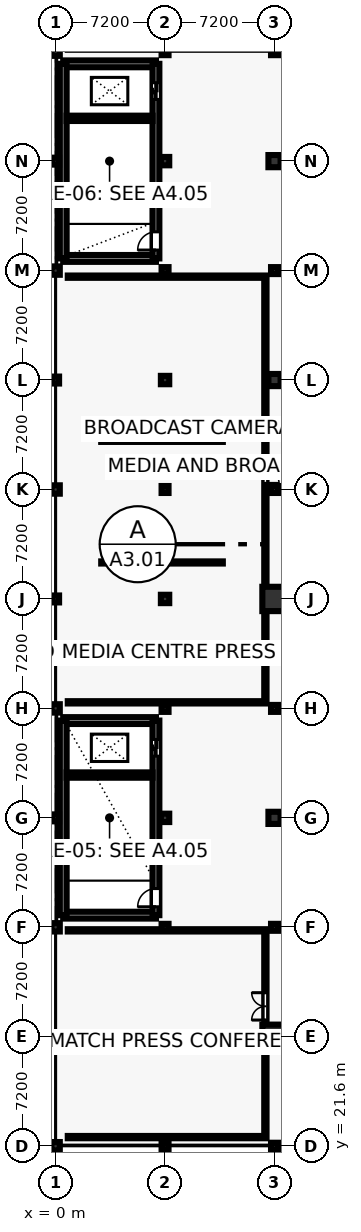
"""IFC4 building model, lengths in metres.
Left out: names, types, materials, properties, quantities, classifications, styles, units other than length and angle.
Written with IfcOpenShell. Run it as: python <this file> out.ifc"""

import sys

from ifc_helpers import new_model, si_unit, direction, frame, frame_2d, origin, origin_2d, place, context, subcontext, project, spatial, rectangle, circle, hollow_circle, extrude, element, fill, save


model = new_model("IFC4")
c1 = context("Model", 3, precision=1e-05, world=origin(), true_north=direction((0.0, 1.0)))
c2 = subcontext(c1, "Body", "Model", "MODEL_VIEW")
j1 = project(units=[si_unit("LENGTHUNIT", "METRE"), si_unit("PLANEANGLEUNIT", "RADIAN")], contexts=[c1])
p1 = place(None, origin())
s1 = spatial("IfcSite", under=j1, at=p1, CompositionType="ELEMENT")
p2 = place(p1, origin())
s2 = spatial("IfcBuilding", under=s1, at=p2, CompositionType="ELEMENT")
p3 = place(p2, frame((0.0, 0.0, 18.6)))
s3 = spatial("IfcBuildingStorey", under=s2, at=p3, CompositionType="ELEMENT", Elevation=18.6)
p4 = place(p3, frame((0.0, 21.6, 0.0), z_axis=(0.0, 0.0, 1.0), x_axis=(1.0, 0.0, 0.0)))
e1 = element("IfcColumn", 1, at=p4, inside=s3, PredefinedType="COLUMN", context=c2, shape_type="SweptSolid", body=[
    extrude(rectangle(XDim=0.55, YDim=0.55, at=origin_2d()), origin(), (0.0, 0.0, 1.0), 4.4),
])
p5 = place(p3, frame((0.0, 28.8, 0.0), z_axis=(0.0, 0.0, 1.0), x_axis=(1.0, 0.0, 0.0)))
e2 = element("IfcColumn", 2, at=p5, inside=s3, PredefinedType="COLUMN", context=c2, shape_type="SweptSolid", body=[
    extrude(hollow_circle(Radius=0.229, WallThickness=0.02, at=origin_2d()), origin(), (0.0, 0.0, 1.0), 4.4),
])
p6 = place(p3, frame((0.0, 36.0, 0.0), z_axis=(0.0, 0.0, 1.0), x_axis=(1.0, 0.0, 0.0)))
e3 = element("IfcColumn", 3, at=p6, inside=s3, PredefinedType="COLUMN", context=c2, shape_type="SweptSolid", body=[
    extrude(rectangle(XDim=0.55, YDim=0.55, at=origin_2d()), origin(), (0.0, 0.0, 1.0), 4.4),
])
p7 = place(p3, frame((0.0, 43.2, 0.0), z_axis=(0.0, 0.0, 1.0), x_axis=(1.0, 0.0, 0.0)))
e4 = element("IfcColumn", 4, at=p7, inside=s3, PredefinedType="COLUMN", context=c2, shape_type="SweptSolid", body=[
    extrude(hollow_circle(Radius=0.229, WallThickness=0.02, at=origin_2d()), origin(), (0.0, 0.0, 1.0), 4.4),
])
p8 = place(p3, frame((0.0, 50.4, 0.0), z_axis=(0.0, 0.0, 1.0), x_axis=(1.0, 0.0, 0.0)))
e5 = element("IfcColumn", 5, at=p8, inside=s3, PredefinedType="COLUMN", context=c2, shape_type="SweptSolid", body=[
    extrude(rectangle(XDim=0.55, YDim=0.55, at=origin_2d()), origin(), (0.0, 0.0, 1.0), 4.4),
])
p9 = place(p3, frame((0.0, 57.6, 0.0), z_axis=(0.0, 0.0, 1.0), x_axis=(1.0, 0.0, 0.0)))
e6 = element("IfcColumn", 6, at=p9, inside=s3, PredefinedType="COLUMN", context=c2, shape_type="SweptSolid", body=[
    extrude(hollow_circle(Radius=0.229, WallThickness=0.02, at=origin_2d()), origin(), (0.0, 0.0, 1.0), 4.4),
])
p10 = place(p3, frame((0.0, 64.8, 0.0), z_axis=(0.0, 0.0, 1.0), x_axis=(1.0, 0.0, 0.0)))
e7 = element("IfcColumn", 7, at=p10, inside=s3, PredefinedType="COLUMN", context=c2, shape_type="SweptSolid", body=[
    extrude(rectangle(XDim=0.55, YDim=0.55, at=origin_2d()), origin(), (0.0, 0.0, 1.0), 4.4),
])
p11 = place(p3, frame((0.0, 72.0, 0.0), z_axis=(0.0, 0.0, 1.0), x_axis=(1.0, 0.0, 0.0)))
e8 = element("IfcColumn", 8, at=p11, inside=s3, PredefinedType="COLUMN", context=c2, shape_type="SweptSolid", body=[
    extrude(hollow_circle(Radius=0.229, WallThickness=0.02, at=origin_2d()), origin(), (0.0, 0.0, 1.0), 4.4),
])
p12 = place(p3, frame((0.0, 79.2, 0.0), z_axis=(0.0, 0.0, 1.0), x_axis=(1.0, 0.0, 0.0)))
e9 = element("IfcColumn", 9, at=p12, inside=s3, PredefinedType="COLUMN", context=c2, shape_type="SweptSolid", body=[
    extrude(rectangle(XDim=0.55, YDim=0.55, at=origin_2d()), origin(), (0.0, 0.0, 1.0), 4.4),
])
p13 = place(p3, frame((0.0, 86.4, 0.0), z_axis=(0.0, 0.0, 1.0), x_axis=(1.0, 0.0, 0.0)))
e10 = element("IfcColumn", 10, at=p13, inside=s3, PredefinedType="COLUMN", context=c2, shape_type="SweptSolid", body=[
    extrude(hollow_circle(Radius=0.229, WallThickness=0.02, at=origin_2d()), origin(), (0.0, 0.0, 1.0), 4.4),
])
p14 = place(p3, frame((0.0, 93.6, 0.0), z_axis=(0.0, 0.0, 1.0), x_axis=(1.0, 0.0, 0.0)))
e11 = element("IfcColumn", 11, at=p14, inside=s3, PredefinedType="COLUMN", context=c2, shape_type="SweptSolid", body=[
    extrude(rectangle(XDim=0.55, YDim=0.55, at=origin_2d()), origin(), (0.0, 0.0, 1.0), 4.4),
])
p15 = place(p3, frame((7.2, 21.6, 0.0), z_axis=(0.0, 0.0, 1.0), x_axis=(1.0, 0.0, 0.0)))
e12 = element("IfcColumn", 12, at=p15, inside=s3, PredefinedType="COLUMN", context=c2, shape_type="SweptSolid", body=[
    extrude(hollow_circle(Radius=0.229, WallThickness=0.02, at=origin_2d()), origin(), (0.0, 0.0, 1.0), 4.4),
])
p16 = place(p3, frame((7.2, 28.8, 0.0), z_axis=(0.0, 0.0, 1.0), x_axis=(1.0, 0.0, 0.0)))
e13 = element("IfcColumn", 13, at=p16, inside=s3, PredefinedType="COLUMN", context=c2, shape_type="SweptSolid", body=[
    extrude(rectangle(XDim=0.55, YDim=0.55, at=origin_2d()), origin(), (0.0, 0.0, 1.0), 4.4),
])
p17 = place(p3, frame((7.2, 36.0, 0.0), z_axis=(0.0, 0.0, 1.0), x_axis=(1.0, 0.0, 0.0)))
e14 = element("IfcColumn", 14, at=p17, inside=s3, PredefinedType="COLUMN", context=c2, shape_type="SweptSolid", body=[
    extrude(hollow_circle(Radius=0.229, WallThickness=0.02, at=origin_2d()), origin(), (0.0, 0.0, 1.0), 4.4),
])
p18 = place(p3, frame((7.2, 43.2, 0.0), z_axis=(0.0, 0.0, 1.0), x_axis=(1.0, 0.0, 0.0)))
e15 = element("IfcColumn", 15, at=p18, inside=s3, PredefinedType="COLUMN", context=c2, shape_type="SweptSolid", body=[
    extrude(rectangle(XDim=0.55, YDim=0.55, at=origin_2d()), origin(), (0.0, 0.0, 1.0), 4.4),
])
p19 = place(p3, frame((7.2, 50.4, 0.0), z_axis=(0.0, 0.0, 1.0), x_axis=(1.0, 0.0, 0.0)))
e16 = element("IfcColumn", 16, at=p19, inside=s3, PredefinedType="COLUMN", context=c2, shape_type="SweptSolid", body=[
    extrude(hollow_circle(Radius=0.229, WallThickness=0.02, at=origin_2d()), origin(), (0.0, 0.0, 1.0), 4.4),
])
p20 = place(p3, frame((7.2, 57.6, 0.0), z_axis=(0.0, 0.0, 1.0), x_axis=(1.0, 0.0, 0.0)))
e17 = element("IfcColumn", 17, at=p20, inside=s3, PredefinedType="COLUMN", context=c2, shape_type="SweptSolid", body=[
    extrude(rectangle(XDim=0.55, YDim=0.55, at=origin_2d()), origin(), (0.0, 0.0, 1.0), 4.4),
])
p21 = place(p3, frame((7.2, 64.8, 0.0), z_axis=(0.0, 0.0, 1.0), x_axis=(1.0, 0.0, 0.0)))
e18 = element("IfcColumn", 18, at=p21, inside=s3, PredefinedType="COLUMN", context=c2, shape_type="SweptSolid", body=[
    extrude(hollow_circle(Radius=0.229, WallThickness=0.02, at=origin_2d()), origin(), (0.0, 0.0, 1.0), 4.4),
])
p22 = place(p3, frame((7.2, 72.0, 0.0), z_axis=(0.0, 0.0, 1.0), x_axis=(1.0, 0.0, 0.0)))
e19 = element("IfcColumn", 19, at=p22, inside=s3, PredefinedType="COLUMN", context=c2, shape_type="SweptSolid", body=[
    extrude(rectangle(XDim=0.55, YDim=0.55, at=origin_2d()), origin(), (0.0, 0.0, 1.0), 4.4),
])
p23 = place(p3, frame((7.2, 79.2, 0.0), z_axis=(0.0, 0.0, 1.0), x_axis=(1.0, 0.0, 0.0)))
e20 = element("IfcColumn", 20, at=p23, inside=s3, PredefinedType="COLUMN", context=c2, shape_type="SweptSolid", body=[
    extrude(hollow_circle(Radius=0.229, WallThickness=0.02, at=origin_2d()), origin(), (0.0, 0.0, 1.0), 4.4),
])
p24 = place(p3, frame((7.2, 86.4, 0.0), z_axis=(0.0, 0.0, 1.0), x_axis=(1.0, 0.0, 0.0)))
e21 = element("IfcColumn", 21, at=p24, inside=s3, PredefinedType="COLUMN", context=c2, shape_type="SweptSolid", body=[
    extrude(rectangle(XDim=0.55, YDim=0.55, at=origin_2d()), origin(), (0.0, 0.0, 1.0), 4.4),
])
for number, where, z_axis, x_axis in (
    (22, (7.2, 93.6, 0.0), (0.0, 0.0, 1.0), (1.0, 0.0, 0.0)),
    (23, (14.4, 21.6, 0.0), (0.0, 0.0, 1.0), (1.0, 0.0, 0.0)),
):
    element("IfcColumn", number, at=place(p3, frame(where, z_axis=z_axis, x_axis=x_axis)), inside=s3, PredefinedType="COLUMN", context=c2, shape_type="SweptSolid", body=[
        extrude(hollow_circle(Radius=0.229, WallThickness=0.02, at=origin_2d()), origin(), (0.0, 0.0, 1.0), 4.4),
    ])
p25 = place(p3, frame((14.4, 28.8, 0.0), z_axis=(0.0, 0.0, 1.0), x_axis=(1.0, 0.0, 0.0)))
e24 = element("IfcColumn", 24, at=p25, inside=s3, PredefinedType="COLUMN", context=c2, shape_type="SweptSolid", body=[
    extrude(circle(Radius=0.8, at=origin_2d()), origin(), (0.0, 0.0, 1.0), 4.4),
])
p26 = place(p3, frame((14.4, 36.0, 0.0), z_axis=(0.0, 0.0, 1.0), x_axis=(1.0, 0.0, 0.0)))
e25 = element("IfcColumn", 25, at=p26, inside=s3, PredefinedType="COLUMN", context=c2, shape_type="SweptSolid", body=[
    extrude(hollow_circle(Radius=0.229, WallThickness=0.02, at=origin_2d()), origin(), (0.0, 0.0, 1.0), 4.4),
])
p27 = place(p3, frame((14.4, 43.2, 0.0), z_axis=(0.0, 0.0, 1.0), x_axis=(1.0, 0.0, 0.0)))
e26 = element("IfcColumn", 26, at=p27, inside=s3, PredefinedType="COLUMN", context=c2, shape_type="SweptSolid", body=[
    extrude(circle(Radius=0.4, at=origin_2d()), origin(), (0.0, 0.0, 1.0), 4.4),
])
p28 = place(p3, frame((14.4, 50.4, 0.0), z_axis=(0.0, 0.0, 1.0), x_axis=(1.0, 0.0, 0.0)))
e27 = element("IfcColumn", 27, at=p28, inside=s3, PredefinedType="COLUMN", context=c2, shape_type="SweptSolid", body=[
    extrude(hollow_circle(Radius=0.229, WallThickness=0.02, at=origin_2d()), origin(), (0.0, 0.0, 1.0), 4.4),
])
p29 = place(p3, frame((14.4, 57.6, 0.0), z_axis=(0.0, 0.0, 1.0), x_axis=(1.0, 0.0, 0.0)))
e28 = element("IfcColumn", 28, at=p29, inside=s3, PredefinedType="COLUMN", context=c2, shape_type="SweptSolid", body=[
    extrude(circle(Radius=0.8, at=origin_2d()), origin(), (0.0, 0.0, 1.0), 4.4),
])
p30 = place(p3, frame((14.4, 64.8, 0.0), z_axis=(0.0, 0.0, 1.0), x_axis=(1.0, 0.0, 0.0)))
e29 = element("IfcColumn", 29, at=p30, inside=s3, PredefinedType="COLUMN", context=c2, shape_type="SweptSolid", body=[
    extrude(hollow_circle(Radius=0.229, WallThickness=0.02, at=origin_2d()), origin(), (0.0, 0.0, 1.0), 4.4),
])
p31 = place(p3, frame((14.4, 72.0, 0.0), z_axis=(0.0, 0.0, 1.0), x_axis=(1.0, 0.0, 0.0)))
e30 = element("IfcColumn", 30, at=p31, inside=s3, PredefinedType="COLUMN", context=c2, shape_type="SweptSolid", body=[
    extrude(circle(Radius=0.4, at=origin_2d()), origin(), (0.0, 0.0, 1.0), 4.4),
])
p32 = place(p3, frame((14.4, 79.2, 0.0), z_axis=(0.0, 0.0, 1.0), x_axis=(1.0, 0.0, 0.0)))
e31 = element("IfcColumn", 31, at=p32, inside=s3, PredefinedType="COLUMN", context=c2, shape_type="SweptSolid", body=[
    extrude(hollow_circle(Radius=0.229, WallThickness=0.02, at=origin_2d()), origin(), (0.0, 0.0, 1.0), 4.4),
])
p33 = place(p3, frame((14.4, 86.4, 0.0), z_axis=(0.0, 0.0, 1.0), x_axis=(1.0, 0.0, 0.0)))
e32 = element("IfcColumn", 32, at=p33, inside=s3, PredefinedType="COLUMN", context=c2, shape_type="SweptSolid", body=[
    extrude(circle(Radius=0.4, at=origin_2d()), origin(), (0.0, 0.0, 1.0), 4.4),
])
p34 = place(p3, frame((14.4, 93.6, 0.0), z_axis=(0.0, 0.0, 1.0), x_axis=(1.0, 0.0, 0.0)))
e33 = element("IfcColumn", 33, at=p34, inside=s3, PredefinedType="COLUMN", context=c2, shape_type="SweptSolid", body=[
    extrude(hollow_circle(Radius=0.229, WallThickness=0.02, at=origin_2d()), origin(), (0.0, 0.0, 1.0), 4.4),
])
for number, where, z_axis, x_axis in (
    (34, (0.5, 36.8, 0.0), (0.0, 0.0, 1.0), (1.0, 0.0, 0.0)),
    (35, (0.5, 49.6, 0.0), (0.0, 0.0, 1.0), (1.0, 0.0, 0.0)),
):
    element("IfcWall", number, at=place(p3, frame(where, z_axis=z_axis, x_axis=x_axis)), inside=s3, PredefinedType="SHEAR", context=c2, shape_type="SweptSolid", body=[
        extrude(rectangle(XDim=6.1, YDim=0.45, at=frame_2d((3.05, 0.0))), origin(), (0.0, 0.0, 1.0), 4.15),
    ])
p35 = place(p3, frame((0.5, 36.8, 0.0), z_axis=(0.0, 0.0, 1.0), x_axis=(0.0, 1.0, 0.0)))
e36 = element("IfcWall", 36, at=p35, inside=s3, PredefinedType="SHEAR", context=c2, shape_type="SweptSolid", body=[
    extrude(rectangle(XDim=12.8, YDim=0.45, at=frame_2d((6.4, 0.0))), origin(), (0.0, 0.0, 1.0), 4.15),
])
p36 = place(p3, frame((6.6, 36.8, 0.0), z_axis=(0.0, 0.0, 1.0), x_axis=(0.0, 1.0, 0.0)))
e37 = element("IfcWall", 37, at=p36, inside=s3, PredefinedType="SHEAR", context=c2, shape_type="SweptSolid", body=[
    extrude(rectangle(XDim=12.8, YDim=0.45, at=frame_2d((6.4, 0.0))), origin(), (0.0, 0.0, 1.0), 4.15),
])
p37 = place(p36, frame((0.55, 0.0, 0.0)))
e38 = element("IfcOpeningElement", 38, at=p37, cuts=e37, PredefinedType="OPENING", context=c2, shape_type="SweptSolid", body=[
    extrude(rectangle(XDim=1.2, YDim=2.25, at=frame_2d((0.6, 1.125))), frame((0.0, 0.235, 0.0), z_axis=(0.0, -1.0, 0.0), x_axis=(1.0, 0.0, 0.0)), (0.0, 0.0, 1.0), 0.47),
])
p38 = place(p36, frame((10.458, 0.0, 0.0)))
e39 = element("IfcOpeningElement", 39, at=p38, cuts=e37, PredefinedType="OPENING", context=c2, shape_type="SweptSolid", body=[
    extrude(rectangle(XDim=1.1, YDim=2.2, at=frame_2d((0.55, 1.1))), frame((0.0, 0.235, 0.0), z_axis=(0.0, -1.0, 0.0), x_axis=(1.0, 0.0, 0.0)), (0.0, 0.0, 1.0), 0.47),
])
p39 = place(p3, frame((0.725, 46.016, 0.0), z_axis=(0.0, 0.0, 1.0), x_axis=(1.0, 0.0, 0.0)))
e40 = element("IfcWall", 40, at=p39, inside=s3, PredefinedType="SHEAR", context=c2, shape_type="SweptSolid", body=[
    extrude(rectangle(XDim=5.65, YDim=0.35, at=frame_2d((2.825, 0.0))), origin(), (0.0, 0.0, 1.0), 4.15),
])
for number, where, z_axis, x_axis in (
    (41, (0.5, 80.0, 0.0), (0.0, 0.0, 1.0), (1.0, 0.0, 0.0)),
    (42, (0.5, 92.8, 0.0), (0.0, 0.0, 1.0), (1.0, 0.0, 0.0)),
):
    element("IfcWall", number, at=place(p3, frame(where, z_axis=z_axis, x_axis=x_axis)), inside=s3, PredefinedType="SHEAR", context=c2, shape_type="SweptSolid", body=[
        extrude(rectangle(XDim=6.1, YDim=0.45, at=frame_2d((3.05, 0.0))), origin(), (0.0, 0.0, 1.0), 4.15),
    ])
p40 = place(p3, frame((0.5, 80.0, 0.0), z_axis=(0.0, 0.0, 1.0), x_axis=(0.0, 1.0, 0.0)))
e43 = element("IfcWall", 43, at=p40, inside=s3, PredefinedType="SHEAR", context=c2, shape_type="SweptSolid", body=[
    extrude(rectangle(XDim=12.8, YDim=0.45, at=frame_2d((6.4, 0.0))), origin(), (0.0, 0.0, 1.0), 4.15),
])
p41 = place(p3, frame((6.6, 80.0, 0.0), z_axis=(0.0, 0.0, 1.0), x_axis=(0.0, 1.0, 0.0)))
e44 = element("IfcWall", 44, at=p41, inside=s3, PredefinedType="SHEAR", context=c2, shape_type="SweptSolid", body=[
    extrude(rectangle(XDim=12.8, YDim=0.45, at=frame_2d((6.4, 0.0))), origin(), (0.0, 0.0, 1.0), 4.15),
])
p42 = place(p41, frame((0.55, 0.0, 0.0)))
e45 = element("IfcOpeningElement", 45, at=p42, cuts=e44, PredefinedType="OPENING", context=c2, shape_type="SweptSolid", body=[
    extrude(rectangle(XDim=1.2, YDim=2.25, at=frame_2d((0.6, 1.125))), frame((0.0, 0.235, 0.0), z_axis=(0.0, -1.0, 0.0), x_axis=(1.0, 0.0, 0.0)), (0.0, 0.0, 1.0), 0.47),
])
p43 = place(p41, frame((10.458, 0.0, 0.0)))
e46 = element("IfcOpeningElement", 46, at=p43, cuts=e44, PredefinedType="OPENING", context=c2, shape_type="SweptSolid", body=[
    extrude(rectangle(XDim=1.1, YDim=2.2, at=frame_2d((0.55, 1.1))), frame((0.0, 0.235, 0.0), z_axis=(0.0, -1.0, 0.0), x_axis=(1.0, 0.0, 0.0)), (0.0, 0.0, 1.0), 0.47),
])
p44 = place(p3, frame((0.725, 89.216, 0.0), z_axis=(0.0, 0.0, 1.0), x_axis=(1.0, 0.0, 0.0)))
e47 = element("IfcWall", 47, at=p44, inside=s3, PredefinedType="SHEAR", context=c2, shape_type="SweptSolid", body=[
    extrude(rectangle(XDim=5.65, YDim=0.35, at=frame_2d((2.825, 0.0))), origin(), (0.0, 0.0, 1.0), 4.15),
])
p45 = place(p3, frame((0.8, 50.8, 0.0), z_axis=(0.0, 0.0, 1.0), x_axis=(1.0, 0.0, 0.0)))
e48 = element("IfcWall", 48, at=p45, inside=s3, PredefinedType="PARTITIONING", context=c2, shape_type="SweptSolid", body=[
    extrude(rectangle(XDim=13.0, YDim=0.15, at=frame_2d((6.5, 0.0))), origin(), (0.0, 0.0, 1.0), 3.21),
])
p46 = place(p3, frame((13.8, 50.8, 0.0), z_axis=(0.0, 0.0, 1.0), x_axis=(0.0, 1.0, 0.0)))
e49 = element("IfcWall", 49, at=p46, inside=s3, PredefinedType="PARTITIONING", context=c2, shape_type="SweptSolid", body=[
    extrude(rectangle(XDim=28.0, YDim=0.15, at=frame_2d((14.0, 0.0))), origin(), (0.0, 0.0, 1.0), 3.21),
])
p47 = place(p46, frame((14.4, 0.0, 0.0)))
e50 = element("IfcOpeningElement", 50, at=p47, cuts=e49, PredefinedType="OPENING", context=c2, shape_type="SweptSolid", body=[
    extrude(rectangle(XDim=1.8, YDim=2.3, at=frame_2d((0.9, 1.15))), frame((0.0, 0.085, 0.0), z_axis=(0.0, -1.0, 0.0), x_axis=(1.0, 0.0, 0.0)), (0.0, 0.0, 1.0), 0.17),
])
for number, where, z_axis, x_axis in (
    (51, (13.8, 78.8, 0.0), (0.0, 0.0, 1.0), (-1.0, 0.0, 0.0)),
    (52, (0.8, 22.2, 0.0), (0.0, 0.0, 1.0), (1.0, 0.0, 0.0)),
):
    element("IfcWall", number, at=place(p3, frame(where, z_axis=z_axis, x_axis=x_axis)), inside=s3, PredefinedType="PARTITIONING", context=c2, shape_type="SweptSolid", body=[
        extrude(rectangle(XDim=13.0, YDim=0.15, at=frame_2d((6.5, 0.0))), origin(), (0.0, 0.0, 1.0), 3.21),
    ])
p48 = place(p3, frame((13.8, 22.2, 0.0), z_axis=(0.0, 0.0, 1.0), x_axis=(0.0, 1.0, 0.0)))
e53 = element("IfcWall", 53, at=p48, inside=s3, PredefinedType="PARTITIONING", context=c2, shape_type="SweptSolid", body=[
    extrude(rectangle(XDim=13.6, YDim=0.15, at=frame_2d((6.8, 0.0))), origin(), (0.0, 0.0, 1.0), 3.21),
])
p49 = place(p48, frame((7.7, 0.0, 0.0)))
e54 = element("IfcOpeningElement", 54, at=p49, cuts=e53, PredefinedType="OPENING", context=c2, shape_type="SweptSolid", body=[
    extrude(rectangle(XDim=1.8, YDim=2.3, at=frame_2d((0.9, 1.15))), frame((0.0, 0.085, 0.0), z_axis=(0.0, -1.0, 0.0), x_axis=(1.0, 0.0, 0.0)), (0.0, 0.0, 1.0), 0.17),
])
p50 = place(p3, frame((13.8, 35.8, 0.0), z_axis=(0.0, 0.0, 1.0), x_axis=(-1.0, 0.0, 0.0)))
e55 = element("IfcWall", 55, at=p50, inside=s3, PredefinedType="PARTITIONING", context=c2, shape_type="SweptSolid", body=[
    extrude(rectangle(XDim=13.0, YDim=0.15, at=frame_2d((6.5, 0.0))), origin(), (0.0, 0.0, 1.0), 3.21),
])
for number, where, z_axis, x_axis in (
    (56, (3.0, 60.0, 0.0), (0.0, 0.0, 1.0), (1.0, 0.0, 0.0)),
    (57, (3.0, 68.0, 0.0), (0.0, 0.0, 1.0), (1.0, 0.0, 0.0)),
):
    element("IfcWall", number, at=place(p3, frame(where, z_axis=z_axis, x_axis=x_axis)), inside=s3, PredefinedType="MOVABLE", context=c2, shape_type="SweptSolid", body=[
        extrude(rectangle(XDim=8.0, YDim=0.14, at=frame_2d((4.0, 0.0))), origin(), (0.0, 0.0, 1.0), 3.2),
    ])
p51 = place(p37, origin())
e58 = element("IfcDoor", 58, at=p51, inside=s3, OperationType="SINGLE_SWING_LEFT", PredefinedType="DOOR", context=c2, shape_type="SweptSolid", body=[
    extrude(rectangle(XDim=1.2, YDim=2.25, at=frame_2d((0.6, 1.125))), frame((0.0, 0.025, 0.0), z_axis=(0.0, -1.0, 0.0), x_axis=(1.0, 0.0, 0.0)), (0.0, 0.0, 1.0), 0.05),
])
fill(e38, e58)
p52 = place(p38, origin())
e59 = element("IfcDoor", 59, at=p52, inside=s3, OperationType="SLIDING_TO_RIGHT", PredefinedType="DOOR", context=c2, shape_type="SweptSolid", body=[
    extrude(rectangle(XDim=1.1, YDim=2.2, at=frame_2d((0.55, 1.1))), frame((0.0, 0.025, 0.0), z_axis=(0.0, -1.0, 0.0), x_axis=(1.0, 0.0, 0.0)), (0.0, 0.0, 1.0), 0.05),
])
fill(e39, e59)
p53 = place(p42, origin())
e60 = element("IfcDoor", 60, at=p53, inside=s3, OperationType="SINGLE_SWING_LEFT", PredefinedType="DOOR", context=c2, shape_type="SweptSolid", body=[
    extrude(rectangle(XDim=1.2, YDim=2.25, at=frame_2d((0.6, 1.125))), frame((0.0, 0.025, 0.0), z_axis=(0.0, -1.0, 0.0), x_axis=(1.0, 0.0, 0.0)), (0.0, 0.0, 1.0), 0.05),
])
fill(e45, e60)
p54 = place(p43, origin())
e61 = element("IfcDoor", 61, at=p54, inside=s3, OperationType="SLIDING_TO_RIGHT", PredefinedType="DOOR", context=c2, shape_type="SweptSolid", body=[
    extrude(rectangle(XDim=1.1, YDim=2.2, at=frame_2d((0.55, 1.1))), frame((0.0, 0.025, 0.0), z_axis=(0.0, -1.0, 0.0), x_axis=(1.0, 0.0, 0.0)), (0.0, 0.0, 1.0), 0.05),
])
fill(e46, e61)
p55 = place(p47, frame((1.8, 0.0, 0.0), z_axis=(0.0, 0.0, 1.0), x_axis=(-1.0, 0.0, 0.0)))
e62 = element("IfcDoor", 62, at=p55, inside=s3, OperationType="DOUBLE_DOOR_SINGLE_SWING", PredefinedType="DOOR", context=c2, shape_type="SweptSolid", body=[
    extrude(rectangle(XDim=1.8, YDim=2.3, at=frame_2d((0.9, 1.15))), frame((0.0, 0.025, 0.0), z_axis=(0.0, -1.0, 0.0), x_axis=(1.0, 0.0, 0.0)), (0.0, 0.0, 1.0), 0.05),
])
fill(e50, e62)
p56 = place(p49, origin())
e63 = element("IfcDoor", 63, at=p56, inside=s3, OperationType="DOUBLE_DOOR_SINGLE_SWING", PredefinedType="DOOR", context=c2, shape_type="SweptSolid", body=[
    extrude(rectangle(XDim=1.8, YDim=2.3, at=frame_2d((0.9, 1.15))), frame((0.0, 0.025, 0.0), z_axis=(0.0, -1.0, 0.0), x_axis=(1.0, 0.0, 0.0)), (0.0, 0.0, 1.0), 0.05),
])
fill(e54, e63)
save(model, sys.argv[1])
